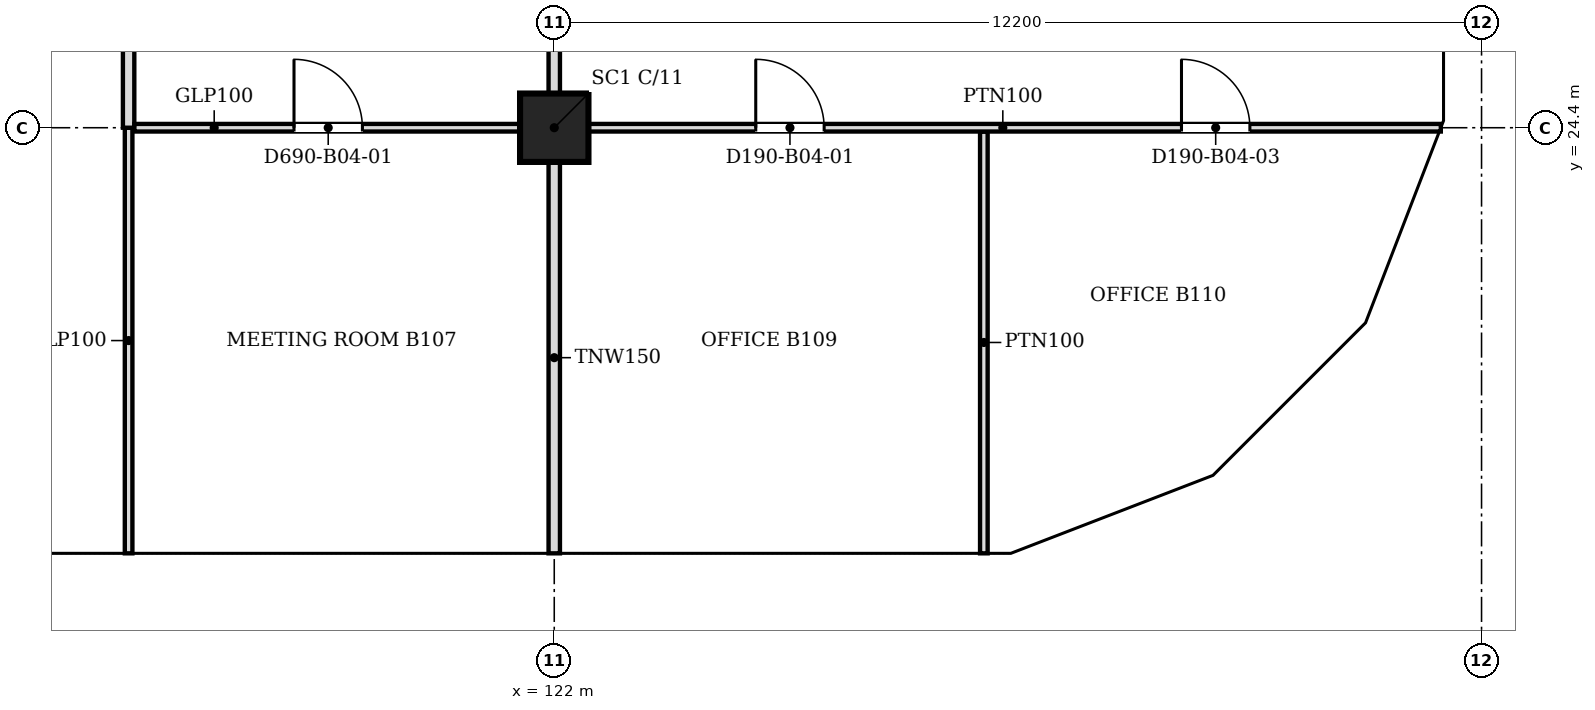
"""IFC4 building model, lengths in metres.
Left out: names, types, materials, properties, quantities, classifications, styles, units other than length and angle.
Written with IfcOpenShell. Run it as: python <this file> out.ifc"""

import sys

from ifc_helpers import new_model, si_unit, direction, frame, frame_2d, origin, origin_2d, place, context, subcontext, project, spatial, polyline, rectangle, outline, extrude, faceted_brep, source, transform, mapped, element, fill, save


model = new_model("IFC4")
c1 = context("Model", 3, precision=1e-05, world=origin(), true_north=direction((0.0, 1.0)))
c2 = subcontext(c1, "Body", "Model", "MODEL_VIEW")
j1 = project(units=[si_unit("LENGTHUNIT", "METRE"), si_unit("PLANEANGLEUNIT", "RADIAN")], contexts=[c1])
p1 = place(None, origin())
s1 = spatial("IfcSite", under=j1, at=p1, CompositionType="ELEMENT")
p2 = place(p1, origin())
s2 = spatial("IfcBuilding", under=s1, at=p2, CompositionType="ELEMENT")
p3 = place(p2, frame((0.0, 0.0, 41.0)))
s3 = spatial("IfcBuildingStorey", under=s2, at=p3, CompositionType="ELEMENT", Elevation=41.0)
p4 = place(p3, frame((122.0, 24.4, 0.0), z_axis=(0.0, 0.0, 1.0), x_axis=(1.0, 0.0, 0.0)))
e1 = element("IfcColumn", 1, at=p4, inside=s3, PredefinedType="COLUMN", context=c2, shape_type="SweptSolid", body=[
    extrude(rectangle(XDim=0.9, YDim=0.9, at=origin_2d()), origin(), (0.0, 0.0, 1.0), 3.6),
])
m1 = source(origin(), c2, "Body", "Brep", [
    faceted_brep([(3.05, -0.25, 0.0), (6.1, -0.25, 3.8), (6.1, -0.25, 3.8), (3.05, -0.25, 7.6), (0.0, -0.25, 3.8), (0.0, 0.25, 3.8), (3.05, 0.25, 7.6), (6.1, 0.25, 3.8), (6.1, 0.25, 3.8), (3.05, 0.25, 0.0)], [[[0, 1, 2, 3, 4]], [[5, 6, 7, 8, 9]], [[9, 8, 1, 0]], [[7, 6, 3, 2]], [[6, 5, 4, 3]], [[5, 9, 0, 4]], [[1, 8, 7, 2]]]),
])
p5 = place(p3, frame((112.85, 18.55, -3.8), z_axis=(0.0, 0.0, 1.0), x_axis=(1.0, 0.0, 0.0)))
e2 = element("IfcWall", 2, at=p5, inside=s3, PredefinedType="SOLIDWALL", context=c2, shape_type="MappedRepresentation", body=[
    mapped(m1, transform((0.0, 0.0, 0.0), scale=1.0)),
])
m2 = source(origin(), c2, "Body", "SweptSolid", [
    extrude(outline(polyline([(3.05, 0.399), (5.78, 3.8), (3.05, 7.201), (0.321, 3.8), (3.05, 0.399)])), frame((0.0, 0.26, 0.0), z_axis=(0.0, -1.0, 0.0), x_axis=(1.0, 0.0, 0.0)), (0.0, 0.0, 1.0), 0.52),
])
p6 = place(p5, origin())
e3 = element("IfcOpeningElement", 3, at=p6, cuts=e2, PredefinedType="OPENING", context=c2, shape_type="MappedRepresentation", body=[
    mapped(m2, transform((0.0, 0.0, 0.0), scale=1.0)),
])
m3 = source(origin(), c2, "Body", "SweptSolid", [
    extrude(outline(polyline([(3.05, 0.0), (6.1, 3.8), (3.05, 7.6), (0.0, 3.8), (3.05, 0.0)])), frame((0.0, 0.25, 0.0), z_axis=(0.0, -1.0, 0.0), x_axis=(1.0, 0.0, 0.0)), (0.0, 0.0, 1.0), 0.5),
])
p7 = place(p3, frame((118.95, 18.55, -3.8), z_axis=(0.0, 0.0, 1.0), x_axis=(1.0, 0.0, 0.0)))
e4 = element("IfcWall", 4, at=p7, inside=s3, PredefinedType="SOLIDWALL", context=c2, shape_type="MappedRepresentation", body=[
    mapped(m3, transform((0.0, 0.0, 0.0), scale=1.0)),
])
p8 = place(p7, origin())
e5 = element("IfcOpeningElement", 5, at=p8, cuts=e4, PredefinedType="OPENING", context=c2, shape_type="MappedRepresentation", body=[
    mapped(m2, transform((0.0, 0.0, 0.0), scale=1.0)),
])
m4 = source(origin(), c2, "Body", "Brep", [
    faceted_brep([(3.003, -0.25, 0.0), (3.05, -0.25, 0.06), (3.05, -0.25, 7.54), (3.003, -0.25, 7.6), (0.0, -0.25, 3.8), (0.0, 0.25, 3.8), (2.957, 0.25, 7.541), (2.957, 0.25, 0.059), (3.003, 0.0, 0.0), (3.003, 0.0, 7.6)], [[[0, 1, 2, 3, 4]], [[5, 6, 7]], [[1, 0, 8]], [[9, 3, 2]], [[6, 5, 4, 3, 9]], [[5, 7, 8, 0, 4]], [[1, 8, 7, 6, 9, 2]]]),
])
p9 = place(p3, frame((125.05, 18.55, -3.8), z_axis=(0.0, 0.0, 1.0), x_axis=(1.0, 0.0, 0.0)))
e6 = element("IfcWall", 6, at=p9, inside=s3, PredefinedType="SOLIDWALL", context=c2, shape_type="MappedRepresentation", body=[
    mapped(m4, transform((0.0, 0.0, 0.0), scale=1.0)),
])
m5 = source(origin(), c2, "Body", "SweptSolid", [
    extrude(outline(polyline([(2.803, 6.944), (0.319, 3.8), (2.803, 0.656), (2.803, 6.944)])), frame((0.0, 0.26, 0.0), z_axis=(0.0, -1.0, 0.0), x_axis=(1.0, 0.0, 0.0)), (0.0, 0.0, 1.0), 0.52),
])
p10 = place(p9, origin())
e7 = element("IfcOpeningElement", 7, at=p10, cuts=e6, PredefinedType="OPENING", context=c2, shape_type="MappedRepresentation", body=[
    mapped(m5, transform((0.0, 0.0, 0.0), scale=1.0)),
])
m6 = source(origin(), c2, "Body", "Brep", [
    faceted_brep([(0.047, -0.25, 0.0), (2.997, -0.25, 3.8), (0.047, -0.25, 7.6), (0.0, -0.25, 7.541), (0.0, -0.25, 0.059), (0.093, 0.25, 7.54), (2.944, 0.25, 3.868), (2.944, 0.25, 3.732), (0.093, 0.25, 0.06), (2.997, 0.0, 3.8), (0.047, 0.0, 0.0), (0.047, 0.0, 7.6)], [[[0, 1, 2, 3, 4]], [[5, 6, 7, 8]], [[8, 7, 9, 1, 0, 10]], [[6, 5, 11, 2, 1, 9]], [[3, 2, 11]], [[10, 0, 4]], [[8, 10, 4, 3, 11, 5]], [[9, 7, 6]]]),
])
p11 = place(p3, frame((128.01, 18.533, -3.8), z_axis=(0.0, 0.0, 1.0), x_axis=(0.932990326376, 0.359901446078, 0.0)))
e8 = element("IfcWall", 8, at=p11, inside=s3, PredefinedType="SOLIDWALL", context=c2, shape_type="MappedRepresentation", body=[
    mapped(m6, transform((0.0, 0.0, 0.0), scale=1.0)),
])
m7 = source(origin(), c2, "Body", "SweptSolid", [
    extrude(outline(polyline([(0.247, 0.665), (2.681, 3.8), (0.247, 6.935), (0.247, 0.665)])), frame((0.0, 0.26, 0.0), z_axis=(0.0, -1.0, 0.0), x_axis=(1.0, 0.0, 0.0)), (0.0, 0.0, 1.0), 0.52),
])
p12 = place(p11, origin())
e9 = element("IfcOpeningElement", 9, at=p12, cuts=e8, PredefinedType="OPENING", context=c2, shape_type="MappedRepresentation", body=[
    mapped(m7, transform((0.0, 0.0, 0.0), scale=1.0)),
])
m8 = source(origin(), c2, "Body", "Brep", [
    faceted_brep([(2.944, -0.25, 0.0), (2.997, -0.25, 0.068), (2.997, -0.25, 7.532), (2.944, -0.25, 7.6), (0.0, -0.25, 3.8), (0.053, 0.25, 3.868), (2.891, 0.25, 7.532), (2.891, 0.25, 0.068), (0.053, 0.25, 3.732), (2.944, 0.0, 0.0), (2.944, 0.0, 7.6), (0.0, 0.0, 3.8)], [[[0, 1, 2, 3, 4]], [[5, 6, 7, 8]], [[1, 0, 9]], [[10, 3, 2]], [[6, 5, 11, 4, 3, 10]], [[8, 7, 9, 0, 4, 11]], [[8, 11, 5]], [[1, 9, 7, 6, 10, 2]]]),
])
p13 = place(p3, frame((130.806, 19.612, -3.8), z_axis=(0.0, 0.0, 1.0), x_axis=(0.707106781187, 0.707106781187, 0.0)))
e10 = element("IfcWall", 10, at=p13, inside=s3, PredefinedType="SOLIDWALL", context=c2, shape_type="MappedRepresentation", body=[
    mapped(m8, transform((0.0, 0.0, 0.0), scale=1.0)),
])
m9 = source(origin(), c2, "Body", "SweptSolid", [
    extrude(outline(polyline([(2.744, 6.934), (0.316, 3.8), (2.744, 0.666), (2.744, 6.934)])), frame((0.0, 0.26, 0.0), z_axis=(0.0, -1.0, 0.0), x_axis=(1.0, 0.0, 0.0)), (0.0, 0.0, 1.0), 0.52),
])
p14 = place(p13, origin())
e11 = element("IfcOpeningElement", 11, at=p14, cuts=e10, PredefinedType="OPENING", context=c2, shape_type="MappedRepresentation", body=[
    mapped(m9, transform((0.0, 0.0, 0.0), scale=1.0)),
])
m10 = source(origin(), c2, "Body", "Brep", [
    faceted_brep([(0.053, -0.25, 0.0), (3.003, -0.25, 3.8), (0.053, -0.25, 7.6), (0.0, -0.25, 7.532), (0.0, -0.25, 0.068), (0.106, 0.25, 7.532), (2.957, 0.25, 3.86), (2.957, 0.25, 3.74), (0.106, 0.25, 0.068), (3.003, 0.0, 3.8), (0.053, 0.0, 0.0), (0.053, 0.0, 7.6)], [[[0, 1, 2, 3, 4]], [[5, 6, 7, 8]], [[8, 7, 9, 1, 0, 10]], [[6, 5, 11, 2, 1, 9]], [[3, 2, 11]], [[10, 0, 4]], [[8, 10, 4, 3, 11, 5]], [[9, 7, 6]]]),
])
p15 = place(p3, frame((132.869, 21.644, -3.8), z_axis=(0.0, 0.0, 1.0), x_axis=(0.359855894603, 0.933007896601, 0.0)))
e12 = element("IfcWall", 12, at=p15, inside=s3, PredefinedType="SOLIDWALL", context=c2, shape_type="MappedRepresentation", body=[
    mapped(m10, transform((0.0, 0.0, 0.0), scale=1.0)),
])
m11 = source(origin(), c2, "Body", "SweptSolid", [
    extrude(outline(polyline([(0.253, 0.665), (2.687, 3.8), (0.253, 6.935), (0.253, 0.665)])), frame((0.0, 0.26, 0.0), z_axis=(0.0, -1.0, 0.0), x_axis=(1.0, 0.0, 0.0)), (0.0, 0.0, 1.0), 0.52),
])
p16 = place(p15, origin())
e13 = element("IfcOpeningElement", 13, at=p16, cuts=e12, PredefinedType="OPENING", context=c2, shape_type="MappedRepresentation", body=[
    mapped(m11, transform((0.0, 0.0, 0.0), scale=1.0)),
])
m12 = source(origin(), c2, "Body", "Brep", [
    faceted_brep([(3.003, -0.25, 0.0), (6.053, -0.25, 3.8), (3.003, -0.25, 7.6), (0.0, -0.25, 3.8), (0.047, 0.25, 3.859), (3.003, 0.25, 7.6), (6.053, 0.25, 3.8), (3.003, 0.25, 0.0), (0.047, 0.25, 3.741), (0.0, 0.0, 3.8)], [[[0, 1, 2, 3]], [[4, 5, 6, 7, 8]], [[7, 6, 1, 0]], [[6, 5, 2, 1]], [[5, 4, 9, 3, 2]], [[8, 7, 0, 3, 9]], [[8, 9, 4]]]),
])
p17 = place(p3, frame((133.95, 24.447, -3.8), z_axis=(0.0, 0.0, 1.0), x_axis=(0.0, 1.0, 0.0)))
e14 = element("IfcWall", 14, at=p17, inside=s3, PredefinedType="SOLIDWALL", context=c2, shape_type="MappedRepresentation", body=[
    mapped(m12, transform((0.0, 0.0, 0.0), scale=1.0)),
])
m13 = source(origin(), c2, "Body", "SweptSolid", [
    extrude(outline(polyline([(3.005, 0.401), (5.733, 3.8), (3.005, 7.199), (0.319, 3.8), (3.005, 0.401)])), frame((0.0, 0.26, 0.0), z_axis=(0.0, -1.0, 0.0), x_axis=(1.0, 0.0, 0.0)), (0.0, 0.0, 1.0), 0.52),
])
p18 = place(p17, origin())
e15 = element("IfcOpeningElement", 15, at=p18, cuts=e14, PredefinedType="OPENING", context=c2, shape_type="MappedRepresentation", body=[
    mapped(m13, transform((0.0, 0.0, 0.0), scale=1.0)),
])
p19 = place(p2, frame((0.0, 0.0, 44.8)))
s4 = spatial("IfcBuildingStorey", under=s2, at=p19, CompositionType="ELEMENT", Elevation=44.8)
p20 = place(p19, frame((109.8, 18.55, -3.8), z_axis=(0.0, 0.0, 1.0), x_axis=(1.0, 0.0, 0.0)))
e16 = element("IfcWall", 16, at=p20, inside=s4, PredefinedType="SOLIDWALL", context=c2, shape_type="MappedRepresentation", body=[
    mapped(m1, transform((0.0, 0.0, 0.0), scale=1.0)),
])
p21 = place(p20, origin())
e17 = element("IfcOpeningElement", 17, at=p21, cuts=e16, PredefinedType="OPENING", context=c2, shape_type="MappedRepresentation", body=[
    mapped(m2, transform((0.0, 0.0, 0.0), scale=1.0)),
])
p22 = place(p19, frame((115.9, 18.55, -3.8), z_axis=(0.0, 0.0, 1.0), x_axis=(1.0, 0.0, 0.0)))
e18 = element("IfcWall", 18, at=p22, inside=s4, PredefinedType="SOLIDWALL", context=c2, shape_type="MappedRepresentation", body=[
    mapped(m3, transform((0.0, 0.0, 0.0), scale=1.0)),
])
p23 = place(p22, origin())
e19 = element("IfcOpeningElement", 19, at=p23, cuts=e18, PredefinedType="OPENING", context=c2, shape_type="MappedRepresentation", body=[
    mapped(m2, transform((0.0, 0.0, 0.0), scale=1.0)),
])
m14 = source(origin(), c2, "Body", "Brep", [
    faceted_brep([(3.05, -0.25, 0.0), (6.053, -0.25, 3.8), (3.05, -0.25, 7.6), (0.0, -0.25, 3.8), (0.0, 0.25, 3.8), (3.05, 0.25, 7.6), (6.007, 0.25, 3.859), (6.007, 0.25, 3.741), (3.05, 0.25, 0.0), (6.053, 0.0, 3.8)], [[[0, 1, 2, 3]], [[4, 5, 6, 7, 8]], [[8, 7, 9, 1, 0]], [[6, 5, 2, 1, 9]], [[5, 4, 3, 2]], [[4, 8, 0, 3]], [[9, 7, 6]]]),
])
p24 = place(p19, frame((122.0, 18.55, -3.8), z_axis=(0.0, 0.0, 1.0), x_axis=(1.0, 0.0, 0.0)))
e20 = element("IfcWall", 20, at=p24, inside=s4, PredefinedType="SOLIDWALL", context=c2, shape_type="MappedRepresentation", body=[
    mapped(m14, transform((0.0, 0.0, 0.0), scale=1.0)),
])
m15 = source(origin(), c2, "Body", "SweptSolid", [
    extrude(outline(polyline([(3.049, 0.401), (5.735, 3.8), (3.049, 7.199), (0.321, 3.8), (3.049, 0.401)])), frame((0.0, 0.26, 0.0), z_axis=(0.0, -1.0, 0.0), x_axis=(1.0, 0.0, 0.0)), (0.0, 0.0, 1.0), 0.52),
])
p25 = place(p24, origin())
e21 = element("IfcOpeningElement", 21, at=p25, cuts=e20, PredefinedType="OPENING", context=c2, shape_type="MappedRepresentation", body=[
    mapped(m15, transform((0.0, 0.0, 0.0), scale=1.0)),
])
m16 = source(origin(), c2, "Body", "Brep", [
    faceted_brep([(2.95, -0.25, 0.0), (3.003, -0.25, 0.068), (3.003, -0.25, 7.532), (2.95, -0.25, 7.6), (0.0, -0.25, 3.8), (0.047, 0.25, 3.86), (2.898, 0.25, 7.532), (2.898, 0.25, 0.068), (0.047, 0.25, 3.74), (2.95, 0.0, 0.0), (2.95, 0.0, 7.6), (0.0, 0.0, 3.8)], [[[0, 1, 2, 3, 4]], [[5, 6, 7, 8]], [[1, 0, 9]], [[10, 3, 2]], [[6, 5, 11, 4, 3, 10]], [[8, 7, 9, 0, 4, 11]], [[8, 11, 5]], [[1, 9, 7, 6, 10, 2]]]),
])
p26 = place(p19, frame((128.053, 18.55, -3.8), z_axis=(0.0, 0.0, 1.0), x_axis=(0.933007896601, 0.359855894603, 0.0)))
e22 = element("IfcWall", 22, at=p26, inside=s4, PredefinedType="SOLIDWALL", context=c2, shape_type="MappedRepresentation", body=[
    mapped(m16, transform((0.0, 0.0, 0.0), scale=1.0)),
])
m17 = source(origin(), c2, "Body", "SweptSolid", [
    extrude(outline(polyline([(2.75, 6.935), (0.316, 3.8), (2.75, 0.665), (2.75, 6.935)])), frame((0.0, 0.26, 0.0), z_axis=(0.0, -1.0, 0.0), x_axis=(1.0, 0.0, 0.0)), (0.0, 0.0, 1.0), 0.52),
])
p27 = place(p26, origin())
e23 = element("IfcOpeningElement", 23, at=p27, cuts=e22, PredefinedType="OPENING", context=c2, shape_type="MappedRepresentation", body=[
    mapped(m17, transform((0.0, 0.0, 0.0), scale=1.0)),
])
m18 = source(origin(), c2, "Body", "Brep", [
    faceted_brep([(0.053, -0.25, 0.0), (2.997, -0.25, 3.8), (0.053, -0.25, 7.6), (0.0, -0.25, 7.532), (0.0, -0.25, 0.068), (0.106, 0.25, 7.532), (2.944, 0.25, 3.868), (2.944, 0.25, 3.732), (0.106, 0.25, 0.068), (2.997, 0.0, 3.8), (0.053, 0.0, 0.0), (0.053, 0.0, 7.6)], [[[0, 1, 2, 3, 4]], [[5, 6, 7, 8]], [[8, 7, 9, 1, 0, 10]], [[6, 5, 11, 2, 1, 9]], [[3, 2, 11]], [[10, 0, 4]], [[8, 10, 4, 3, 11, 5]], [[9, 7, 6]]]),
])
p28 = place(p19, frame((130.769, 19.574, -3.8), z_axis=(0.0, 0.0, 1.0), x_axis=(0.707106781187, 0.707106781187, 0.0)))
e24 = element("IfcWall", 24, at=p28, inside=s4, PredefinedType="SOLIDWALL", context=c2, shape_type="MappedRepresentation", body=[
    mapped(m18, transform((0.0, 0.0, 0.0), scale=1.0)),
])
m19 = source(origin(), c2, "Body", "SweptSolid", [
    extrude(outline(polyline([(0.253, 0.666), (2.681, 3.8), (0.253, 6.934), (0.253, 0.666)])), frame((0.0, 0.26, 0.0), z_axis=(0.0, -1.0, 0.0), x_axis=(1.0, 0.0, 0.0)), (0.0, 0.0, 1.0), 0.52),
])
p29 = place(p28, origin())
e25 = element("IfcOpeningElement", 25, at=p29, cuts=e24, PredefinedType="OPENING", context=c2, shape_type="MappedRepresentation", body=[
    mapped(m19, transform((0.0, 0.0, 0.0), scale=1.0)),
])
m20 = source(origin(), c2, "Body", "Brep", [
    faceted_brep([(2.95, -0.25, 0.0), (2.997, -0.25, 0.059), (2.997, -0.25, 7.541), (2.95, -0.25, 7.6), (0.0, -0.25, 3.8), (0.053, 0.25, 3.868), (2.904, 0.25, 7.54), (2.904, 0.25, 0.06), (0.053, 0.25, 3.732), (2.95, 0.0, 0.0), (2.95, 0.0, 7.6), (0.0, 0.0, 3.8)], [[[0, 1, 2, 3, 4]], [[5, 6, 7, 8]], [[1, 0, 9]], [[10, 3, 2]], [[6, 5, 11, 4, 3, 10]], [[8, 7, 9, 0, 4, 11]], [[8, 11, 5]], [[1, 9, 7, 6, 10, 2]]]),
])
p30 = place(p19, frame((132.888, 21.694, -3.8), z_axis=(0.0, 0.0, 1.0), x_axis=(0.359901446078, 0.932990326376, 0.0)))
e26 = element("IfcWall", 26, at=p30, inside=s4, PredefinedType="SOLIDWALL", context=c2, shape_type="MappedRepresentation", body=[
    mapped(m20, transform((0.0, 0.0, 0.0), scale=1.0)),
])
p31 = place(p30, origin())
e27 = element("IfcOpeningElement", 27, at=p31, cuts=e26, PredefinedType="OPENING", context=c2, shape_type="MappedRepresentation", body=[
    mapped(m17, transform((0.0, 0.0, 0.0), scale=1.0)),
])
m21 = source(origin(), c2, "Body", "Brep", [
    faceted_brep([(0.047, -0.25, 0.0), (3.05, -0.25, 3.8), (0.047, -0.25, 7.6), (0.0, -0.25, 7.54), (0.0, -0.25, 0.06), (0.093, 0.25, 7.541), (3.05, 0.25, 3.8), (0.093, 0.25, 0.059), (0.047, 0.0, 0.0), (0.047, 0.0, 7.6)], [[[0, 1, 2, 3, 4]], [[5, 6, 7]], [[7, 6, 1, 0, 8]], [[6, 5, 9, 2, 1]], [[3, 2, 9]], [[8, 0, 4]], [[7, 8, 4, 3, 9, 5]]]),
])
p32 = place(p19, frame((133.95, 24.4, -3.8), z_axis=(0.0, 0.0, 1.0), x_axis=(0.0, 1.0, 0.0)))
e28 = element("IfcWall", 28, at=p32, inside=s4, PredefinedType="SOLIDWALL", context=c2, shape_type="MappedRepresentation", body=[
    mapped(m21, transform((0.0, 0.0, 0.0), scale=1.0)),
])
m22 = source(origin(), c2, "Body", "SweptSolid", [
    extrude(outline(polyline([(0.247, 0.656), (2.731, 3.8), (0.247, 6.944), (0.247, 0.656)])), frame((0.0, 0.26, 0.0), z_axis=(0.0, -1.0, 0.0), x_axis=(1.0, 0.0, 0.0)), (0.0, 0.0, 1.0), 0.52),
])
p33 = place(p32, origin())
e29 = element("IfcOpeningElement", 29, at=p33, cuts=e28, PredefinedType="OPENING", context=c2, shape_type="MappedRepresentation", body=[
    mapped(m22, transform((0.0, 0.0, 0.0), scale=1.0)),
])
p34 = place(p3, frame((116.4, 18.8, 0.0), z_axis=(0.0, 0.0, 1.0), x_axis=(0.0, 1.0, 0.0)))
e30 = element("IfcWall", 30, at=p34, inside=s3, PredefinedType="PARTITIONING", context=c2, shape_type="SweptSolid", body=[
    extrude(rectangle(XDim=5.599, YDim=0.1, at=frame_2d((2.799, 0.0))), origin(), (0.0, 0.0, 1.0), 3.067),
])
p35 = place(p3, frame((122.0, 18.8, 0.0), z_axis=(0.0, 0.0, 1.0), x_axis=(0.0, 1.0, 0.0)))
e31 = element("IfcWall", 31, at=p35, inside=s3, PredefinedType="PARTITIONING", context=c2, shape_type="SweptSolid", body=[
    extrude(rectangle(XDim=5.149, YDim=0.15, at=frame_2d((2.574, 0.0))), origin(), (0.0, 0.0, 1.0), 3.067),
])
p36 = place(p3, frame((127.652, 18.8, 0.0), z_axis=(0.0, 0.0, 1.0), x_axis=(0.0, 1.0, 0.0)))
e32 = element("IfcWall", 32, at=p36, inside=s3, PredefinedType="PARTITIONING", context=c2, shape_type="SweptSolid", body=[
    extrude(rectangle(XDim=5.549, YDim=0.1, at=frame_2d((2.774, 0.0))), origin(), (0.0, 0.0, 1.0), 3.067),
])
p37 = place(p3, frame((116.4, 24.4, 0.0), z_axis=(0.0, 0.0, 1.0), x_axis=(0.0, 1.0, 0.0)))
e33 = element("IfcWall", 33, at=p37, inside=s3, PredefinedType="PARTITIONING", context=c2, shape_type="SweptSolid", body=[
    extrude(rectangle(XDim=8.924, YDim=0.15, at=frame_2d((4.462, 0.0))), origin(), (0.0, 0.0, 1.0), 3.067),
])
p38 = place(p3, frame((121.549, 24.4, 0.0), z_axis=(0.0, 0.0, 1.0), x_axis=(-1.0, 0.0, 0.0)))
e34 = element("IfcWall", 34, at=p38, inside=s3, PredefinedType="PARTITIONING", context=c2, shape_type="SweptSolid", body=[
    extrude(rectangle(XDim=5.073, YDim=0.1, at=frame_2d((2.537, 0.0))), origin(), (0.0, 0.0, 1.0), 3.067),
])
m23 = source(origin(), c2, "Body", "SweptSolid", [
    extrude(rectangle(XDim=0.9, YDim=2.1, at=frame_2d((0.45, 1.05))), frame((0.0, 0.06, 0.0), z_axis=(0.0, -1.0, 0.0), x_axis=(1.0, 0.0, 0.0)), (0.0, 0.0, 1.0), 0.12),
])
p39 = place(p38, frame((2.073, 0.0, 0.0)))
e35 = element("IfcOpeningElement", 35, at=p39, cuts=e34, PredefinedType="OPENING", context=c2, shape_type="MappedRepresentation", body=[
    mapped(m23, transform((0.0, 0.0, 0.0), scale=1.0)),
])
p40 = place(p3, frame((133.664, 24.4, 0.0), z_axis=(0.0, 0.0, 1.0), x_axis=(-1.0, 0.0, 0.0)))
e36 = element("IfcWall", 36, at=p40, inside=s3, PredefinedType="PARTITIONING", context=c2, shape_type="SweptSolid", body=[
    extrude(rectangle(XDim=11.213, YDim=0.1, at=frame_2d((5.606, 0.0))), origin(), (0.0, 0.0, 1.0), 3.067),
])
p41 = place(p40, frame((8.113, 0.0, 0.0)))
e37 = element("IfcOpeningElement", 37, at=p41, cuts=e36, PredefinedType="OPENING", context=c2, shape_type="MappedRepresentation", body=[
    mapped(m23, transform((0.0, 0.0, 0.0), scale=1.0)),
])
p42 = place(p40, frame((2.512, 0.0, 0.0)))
e38 = element("IfcOpeningElement", 38, at=p42, cuts=e36, PredefinedType="OPENING", context=c2, shape_type="MappedRepresentation", body=[
    mapped(m23, transform((0.0, 0.0, 0.0), scale=1.0)),
])
p43 = place(p3, frame((122.0, 24.851, 0.0), z_axis=(0.0, 0.0, 1.0), x_axis=(0.0, 1.0, 0.0)))
e39 = element("IfcWall", 39, at=p43, inside=s3, PredefinedType="PARTITIONING", context=c2, shape_type="SweptSolid", body=[
    extrude(rectangle(XDim=8.473, YDim=0.15, at=frame_2d((4.236, 0.0))), origin(), (0.0, 0.0, 1.0), 3.067),
])
m24 = source(origin(), c2, "Body", "SweptSolid", [
    extrude(rectangle(XDim=0.9, YDim=2.1, at=frame_2d((0.45, 1.05))), frame((0.0, 0.025, 0.0), z_axis=(0.0, -1.0, 0.0), x_axis=(1.0, 0.0, 0.0)), (0.0, 0.0, 1.0), 0.05),
])
p44 = place(p39, origin())
e40 = element("IfcDoor", 40, at=p44, inside=s3, OperationType="SINGLE_SWING_RIGHT", PredefinedType="DOOR", context=c2, shape_type="MappedRepresentation", body=[
    mapped(m24, transform((0.0, 0.0, 0.0), scale=1.0)),
])
fill(e35, e40)
p45 = place(p41, origin())
e41 = element("IfcDoor", 41, at=p45, inside=s3, OperationType="SINGLE_SWING_RIGHT", PredefinedType="DOOR", context=c2, shape_type="MappedRepresentation", body=[
    mapped(m24, transform((0.0, 0.0, 0.0), scale=1.0)),
])
fill(e37, e41)
p46 = place(p42, origin())
e42 = element("IfcDoor", 42, at=p46, inside=s3, OperationType="SINGLE_SWING_RIGHT", PredefinedType="DOOR", context=c2, shape_type="MappedRepresentation", body=[
    mapped(m24, transform((0.0, 0.0, 0.0), scale=1.0)),
])
fill(e38, e42)
save(model, sys.argv[1])
